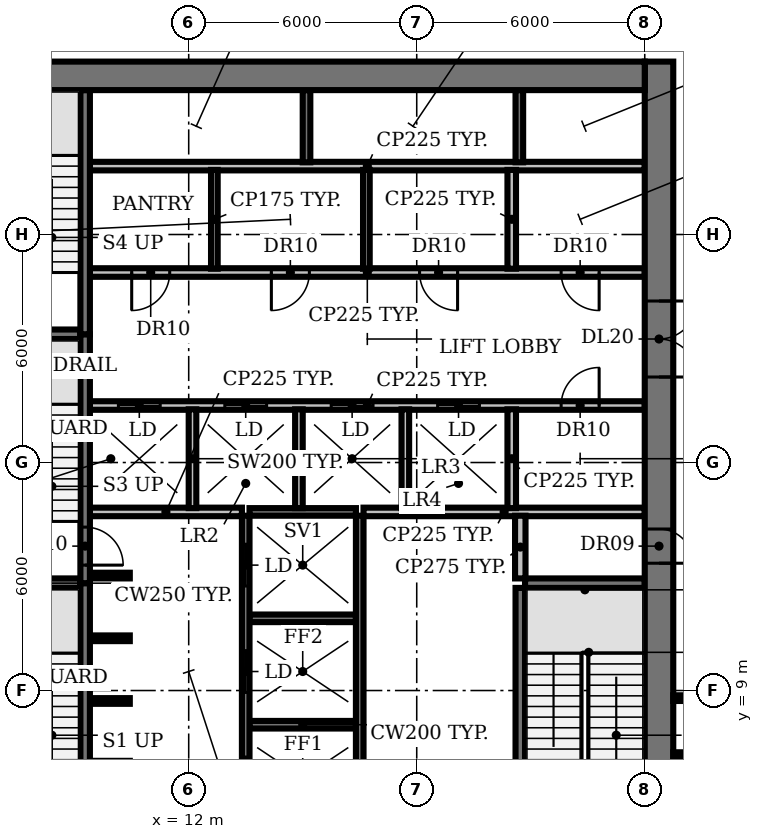
"""IFC4 building model, lengths in metres.
Left out: names, types, materials, properties, quantities, classifications, styles, units other than length and angle.
Written with IfcOpenShell. Run it as: python <this file> out.ifc"""

import sys

from ifc_helpers import new_model, si_unit, direction, frame, frame_2d, origin, place, context, subcontext, project, spatial, rectangle, extrude, element, fill, save


model = new_model("IFC4")
c1 = context("Model", 3, precision=1e-05, world=origin(), true_north=direction((0.0, 1.0)))
c2 = subcontext(c1, "Body", "Model", "MODEL_VIEW")
j1 = project(units=[si_unit("LENGTHUNIT", "METRE"), si_unit("PLANEANGLEUNIT", "RADIAN")], contexts=[c1])
p1 = place(None, origin())
s1 = spatial("IfcSite", under=j1, at=p1, CompositionType="ELEMENT")
p2 = place(p1, origin())
s2 = spatial("IfcBuilding", under=s1, at=p2, CompositionType="ELEMENT")
p3 = place(p2, frame((0.0, 0.0, 92.0)))
s3 = spatial("IfcBuildingStorey", under=s2, at=p3, CompositionType="ELEMENT", Elevation=92.0)
p4 = place(p3, frame((13.6, 8.1, 0.0), z_axis=(0.0, 0.0, 1.0), x_axis=(1.0, 0.0, 0.0)))
e1 = element("IfcWall", 1, at=p4, inside=s3, PredefinedType="SHEAR", context=c2, shape_type="SweptSolid", body=[
    extrude(rectangle(XDim=2.8, YDim=0.2, at=frame_2d((1.4, 0.0))), origin(), (0.0, 0.0, 1.0), 3.85),
])
for number, where, z_axis, x_axis in (
    (2, (9.4, 8.725, 0.0), (0.0, 0.0, 1.0), (1.0, 0.0, 0.0)),
    (3, (9.4, 10.375, 0.0), (0.0, 0.0, 1.0), (1.0, 0.0, 0.0)),
):
    element("IfcWall", number, at=place(p3, frame(where, z_axis=z_axis, x_axis=x_axis)), inside=s3, PredefinedType="SHEAR", context=c2, shape_type="SweptSolid", body=[
        extrude(rectangle(XDim=1.05, YDim=0.15, at=frame_2d((0.525, 0.0))), origin(), (0.0, 0.0, 1.0), 3.85),
    ])
p5 = place(p3, frame((13.6, 10.9, 0.0), z_axis=(0.0, 0.0, 1.0), x_axis=(1.0, 0.0, 0.0)))
e4 = element("IfcWall", 4, at=p5, inside=s3, PredefinedType="SHEAR", context=c2, shape_type="SweptSolid", body=[
    extrude(rectangle(XDim=2.8, YDim=0.2, at=frame_2d((1.4, 0.0))), origin(), (0.0, 0.0, 1.0), 3.85),
])
for number, where, z_axis, x_axis in (
    (5, (6.0, 11.825, 0.0), (0.0, 0.0, 1.0), (1.0, 0.0, 0.0)),
    (6, (20.85, 11.825, 0.0), (0.0, 0.0, 1.0), (1.0, 0.0, 0.0)),
):
    element("IfcWall", number, at=place(p3, frame(where, z_axis=z_axis, x_axis=x_axis)), inside=s3, PredefinedType="SHEAR", context=c2, shape_type="SweptSolid", body=[
        extrude(rectangle(XDim=3.15, YDim=0.25, at=frame_2d((1.575, 0.0))), origin(), (0.0, 0.0, 1.0), 3.85),
    ])
p6 = place(p3, frame((9.4, 12.025, 0.0), z_axis=(0.0, 0.0, 1.0), x_axis=(1.0, 0.0, 0.0)))
e7 = element("IfcWall", 7, at=p6, inside=s3, PredefinedType="SHEAR", context=c2, shape_type="SweptSolid", body=[
    extrude(rectangle(XDim=1.05, YDim=0.15, at=frame_2d((0.525, 0.0))), origin(), (0.0, 0.0, 1.0), 3.85),
])
p7 = place(p3, frame((9.4, 13.7, 0.0), z_axis=(0.0, 0.0, 1.0), x_axis=(1.0, 0.0, 0.0)))
e8 = element("IfcWall", 8, at=p7, inside=s3, PredefinedType="PARTITIONING", context=c2, shape_type="SweptSolid", body=[
    extrude(rectangle(XDim=4.0, YDim=0.225, at=frame_2d((2.0, 0.0))), origin(), (0.0, 0.0, 1.0), 3.85),
])
p8 = place(p3, frame((13.6, 13.7, 0.0), z_axis=(0.0, 0.0, 1.0), x_axis=(1.0, 0.0, 0.0)))
e9 = element("IfcWall", 9, at=p8, inside=s3, PredefinedType="SHEAR", context=c2, shape_type="SweptSolid", body=[
    extrude(rectangle(XDim=2.8, YDim=0.2, at=frame_2d((1.4, 0.0))), origin(), (0.0, 0.0, 1.0), 3.85),
])
p9 = place(p3, frame((16.6, 13.7, 0.0), z_axis=(0.0, 0.0, 1.0), x_axis=(1.0, 0.0, 0.0)))
e10 = element("IfcWall", 10, at=p9, inside=s3, PredefinedType="PARTITIONING", context=c2, shape_type="SweptSolid", body=[
    extrude(rectangle(XDim=7.4, YDim=0.225, at=frame_2d((3.7, 0.0))), origin(), (0.0, 0.0, 1.0), 3.85),
])
p10 = place(p3, frame((9.4, 16.5, 0.0), z_axis=(0.0, 0.0, 1.0), x_axis=(1.0, 0.0, 0.0)))
e11 = element("IfcWall", 11, at=p10, inside=s3, PredefinedType="PARTITIONING", context=c2, shape_type="SweptSolid", body=[
    extrude(rectangle(XDim=14.6, YDim=0.225, at=frame_2d((7.3, 0.0))), origin(), (0.0, 0.0, 1.0), 3.85),
])
p11 = place(p10, frame((0.75, 0.0, 0.0)))
e12 = element("IfcOpeningElement", 12, at=p11, cuts=e11, PredefinedType="OPENING", context=c2, shape_type="SweptSolid", body=[
    extrude(rectangle(XDim=1.1, YDim=2.1, at=frame_2d((0.55, 1.05))), frame((0.0, 0.123, 0.0), z_axis=(0.0, -1.0, 0.0), x_axis=(1.0, 0.0, 0.0)), (0.0, 0.0, 1.0), 0.245),
])
p12 = place(p10, frame((3.55, 0.0, 0.0)))
e13 = element("IfcOpeningElement", 13, at=p12, cuts=e11, PredefinedType="OPENING", context=c2, shape_type="SweptSolid", body=[
    extrude(rectangle(XDim=1.1, YDim=2.1, at=frame_2d((0.55, 1.05))), frame((0.0, 0.123, 0.0), z_axis=(0.0, -1.0, 0.0), x_axis=(1.0, 0.0, 0.0)), (0.0, 0.0, 1.0), 0.245),
])
p13 = place(p10, frame((6.35, 0.0, 0.0)))
e14 = element("IfcOpeningElement", 14, at=p13, cuts=e11, PredefinedType="OPENING", context=c2, shape_type="SweptSolid", body=[
    extrude(rectangle(XDim=1.1, YDim=2.1, at=frame_2d((0.55, 1.05))), frame((0.0, 0.123, 0.0), z_axis=(0.0, -1.0, 0.0), x_axis=(1.0, 0.0, 0.0)), (0.0, 0.0, 1.0), 0.245),
])
p14 = place(p10, frame((9.15, 0.0, 0.0)))
e15 = element("IfcOpeningElement", 15, at=p14, cuts=e11, PredefinedType="OPENING", context=c2, shape_type="SweptSolid", body=[
    extrude(rectangle(XDim=1.1, YDim=2.1, at=frame_2d((0.55, 1.05))), frame((0.0, 0.123, 0.0), z_axis=(0.0, -1.0, 0.0), x_axis=(1.0, 0.0, 0.0)), (0.0, 0.0, 1.0), 0.245),
])
p15 = place(p10, frame((12.4, 0.0, 0.0)))
e16 = element("IfcOpeningElement", 16, at=p15, cuts=e11, PredefinedType="OPENING", context=c2, shape_type="SweptSolid", body=[
    extrude(rectangle(XDim=1.0, YDim=2.1, at=frame_2d((0.5, 1.05))), frame((0.0, 0.123, 0.0), z_axis=(0.0, -1.0, 0.0), x_axis=(1.0, 0.0, 0.0)), (0.0, 0.0, 1.0), 0.245),
])
p16 = place(p3, frame((6.0, 18.375, 0.0), z_axis=(0.0, 0.0, 1.0), x_axis=(1.0, 0.0, 0.0)))
e17 = element("IfcWall", 17, at=p16, inside=s3, PredefinedType="SHEAR", context=c2, shape_type="SweptSolid", body=[
    extrude(rectangle(XDim=3.15, YDim=0.25, at=frame_2d((1.575, 0.0))), origin(), (0.0, 0.0, 1.0), 3.85),
])
p17 = place(p3, frame((24.0, 20.0, 0.0), z_axis=(0.0, 0.0, 1.0), x_axis=(-1.0, 0.0, 0.0)))
e18 = element("IfcWall", 18, at=p17, inside=s3, PredefinedType="PARTITIONING", context=c2, shape_type="SweptSolid", body=[
    extrude(rectangle(XDim=14.6, YDim=0.225, at=frame_2d((7.3, 0.0))), origin(), (0.0, 0.0, 1.0), 3.85),
])
p18 = place(p17, frame((12.5, 0.0, 0.0)))
e19 = element("IfcOpeningElement", 19, at=p18, cuts=e18, PredefinedType="OPENING", context=c2, shape_type="SweptSolid", body=[
    extrude(rectangle(XDim=1.0, YDim=2.1, at=frame_2d((0.5, 1.05))), frame((0.0, 0.123, 0.0), z_axis=(0.0, -1.0, 0.0), x_axis=(1.0, 0.0, 0.0)), (0.0, 0.0, 1.0), 0.245),
])
p19 = place(p17, frame((8.825, 0.0, 0.0)))
e20 = element("IfcOpeningElement", 20, at=p19, cuts=e18, PredefinedType="OPENING", context=c2, shape_type="SweptSolid", body=[
    extrude(rectangle(XDim=1.0, YDim=2.1, at=frame_2d((0.5, 1.05))), frame((0.0, 0.123, 0.0), z_axis=(0.0, -1.0, 0.0), x_axis=(1.0, 0.0, 0.0)), (0.0, 0.0, 1.0), 0.245),
])
p20 = place(p17, frame((4.925, 0.0, 0.0)))
e21 = element("IfcOpeningElement", 21, at=p20, cuts=e18, PredefinedType="OPENING", context=c2, shape_type="SweptSolid", body=[
    extrude(rectangle(XDim=1.0, YDim=2.1, at=frame_2d((0.5, 1.05))), frame((0.0, 0.123, 0.0), z_axis=(0.0, -1.0, 0.0), x_axis=(1.0, 0.0, 0.0)), (0.0, 0.0, 1.0), 0.245),
])
p21 = place(p17, frame((1.2, 0.0, 0.0)))
e22 = element("IfcOpeningElement", 22, at=p21, cuts=e18, PredefinedType="OPENING", context=c2, shape_type="SweptSolid", body=[
    extrude(rectangle(XDim=1.0, YDim=2.1, at=frame_2d((0.5, 1.05))), frame((0.0, 0.123, 0.0), z_axis=(0.0, -1.0, 0.0), x_axis=(1.0, 0.0, 0.0)), (0.0, 0.0, 1.0), 0.245),
])
p22 = place(p3, frame((9.4, 22.8, 0.0), z_axis=(0.0, 0.0, 1.0), x_axis=(1.0, 0.0, 0.0)))
e23 = element("IfcWall", 23, at=p22, inside=s3, PredefinedType="PARTITIONING", context=c2, shape_type="SweptSolid", body=[
    extrude(rectangle(XDim=14.6, YDim=0.225, at=frame_2d((7.3, 0.0))), origin(), (0.0, 0.0, 1.0), 3.85),
])
p23 = place(p3, frame((9.275, 11.825, 0.0), z_axis=(0.0, 0.0, 1.0), x_axis=(0.0, -1.0, 0.0)))
e24 = element("IfcWall", 24, at=p23, inside=s3, PredefinedType="SHEAR", context=c2, shape_type="SweptSolid", body=[
    extrude(rectangle(XDim=6.425, YDim=0.25, at=frame_2d((3.212, 0.0))), origin(), (0.0, 0.0, 1.0), 3.85),
])
p24 = place(p23, frame((5.075, 0.0, 0.0)))
e25 = element("IfcOpeningElement", 25, at=p24, cuts=e24, PredefinedType="OPENING", context=c2, shape_type="SweptSolid", body=[
    extrude(rectangle(XDim=1.0, YDim=2.1, at=frame_2d((0.5, 1.05))), frame((0.0, 0.135, 0.0), z_axis=(0.0, -1.0, 0.0), x_axis=(1.0, 0.0, 0.0)), (0.0, 0.0, 1.0), 0.27),
])
p25 = place(p3, frame((9.275, 18.375, 0.0), z_axis=(0.0, 0.0, 1.0), x_axis=(0.0, -1.0, 0.0)))
e26 = element("IfcWall", 26, at=p25, inside=s3, PredefinedType="SHEAR", context=c2, shape_type="SweptSolid", body=[
    extrude(rectangle(XDim=6.55, YDim=0.25, at=frame_2d((3.275, 0.0))), origin(), (0.0, 0.0, 1.0), 3.85),
])
p26 = place(p25, frame((5.075, 0.0, 0.0)))
e27 = element("IfcOpeningElement", 27, at=p26, cuts=e26, PredefinedType="OPENING", context=c2, shape_type="SweptSolid", body=[
    extrude(rectangle(XDim=1.0, YDim=2.1, at=frame_2d((0.5, 1.05))), frame((0.0, 0.135, 0.0), z_axis=(0.0, -1.0, 0.0), x_axis=(1.0, 0.0, 0.0)), (0.0, 0.0, 1.0), 0.27),
])
p27 = place(p3, frame((9.275, 18.375, 0.0), z_axis=(0.0, 0.0, 1.0), x_axis=(0.0, 1.0, 0.0)))
e28 = element("IfcWall", 28, at=p27, inside=s3, PredefinedType="SHEAR", context=c2, shape_type="SweptSolid", body=[
    extrude(rectangle(XDim=6.425, YDim=0.25, at=frame_2d((3.212, 0.0))), origin(), (0.0, 0.0, 1.0), 3.85),
])
p28 = place(p3, frame((12.1, 13.8, 0.0), z_axis=(0.0, 0.0, 1.0), x_axis=(0.0, 1.0, 0.0)))
e29 = element("IfcWall", 29, at=p28, inside=s3, PredefinedType="SOLIDWALL", context=c2, shape_type="SweptSolid", body=[
    extrude(rectangle(XDim=2.6, YDim=0.2, at=frame_2d((1.3, 0.0))), origin(), (0.0, 0.0, 1.0), 3.85),
])
p29 = place(p3, frame((12.675, 20.1, 0.0), z_axis=(0.0, 0.0, 1.0), x_axis=(0.0, 1.0, 0.0)))
e30 = element("IfcWall", 30, at=p29, inside=s3, PredefinedType="PARTITIONING", context=c2, shape_type="SweptSolid", body=[
    extrude(rectangle(XDim=2.6, YDim=0.175, at=frame_2d((1.3, 0.0))), origin(), (0.0, 0.0, 1.0), 3.85),
])
p30 = place(p3, frame((13.5, 5.4, 0.0), z_axis=(0.0, 0.0, 1.0), x_axis=(0.0, 1.0, 0.0)))
e31 = element("IfcWall", 31, at=p30, inside=s3, PredefinedType="SHEAR", context=c2, shape_type="SweptSolid", body=[
    extrude(rectangle(XDim=8.2, YDim=0.2, at=frame_2d((4.1, 0.0))), origin(), (0.0, 0.0, 1.0), 3.85),
])
p31 = place(p30, frame((0.75, 0.0, 0.0)))
e32 = element("IfcOpeningElement", 32, at=p31, cuts=e31, PredefinedType="OPENING", context=c2, shape_type="SweptSolid", body=[
    extrude(rectangle(XDim=1.1, YDim=2.1, at=frame_2d((0.55, 1.05))), frame((0.0, 0.11, 0.0), z_axis=(0.0, -1.0, 0.0), x_axis=(1.0, 0.0, 0.0)), (0.0, 0.0, 1.0), 0.22),
])
p32 = place(p30, frame((3.55, 0.0, 0.0)))
e33 = element("IfcOpeningElement", 33, at=p32, cuts=e31, PredefinedType="OPENING", context=c2, shape_type="SweptSolid", body=[
    extrude(rectangle(XDim=1.1, YDim=2.1, at=frame_2d((0.55, 1.05))), frame((0.0, 0.11, 0.0), z_axis=(0.0, -1.0, 0.0), x_axis=(1.0, 0.0, 0.0)), (0.0, 0.0, 1.0), 0.22),
])
p33 = place(p30, frame((6.35, 0.0, 0.0)))
e34 = element("IfcOpeningElement", 34, at=p33, cuts=e31, PredefinedType="OPENING", context=c2, shape_type="SweptSolid", body=[
    extrude(rectangle(XDim=1.1, YDim=2.1, at=frame_2d((0.55, 1.05))), frame((0.0, 0.11, 0.0), z_axis=(0.0, -1.0, 0.0), x_axis=(1.0, 0.0, 0.0)), (0.0, 0.0, 1.0), 0.22),
])
p34 = place(p3, frame((14.9, 13.8, 0.0), z_axis=(0.0, 0.0, 1.0), x_axis=(0.0, 1.0, 0.0)))
e35 = element("IfcWall", 35, at=p34, inside=s3, PredefinedType="SOLIDWALL", context=c2, shape_type="SweptSolid", body=[
    extrude(rectangle(XDim=2.6, YDim=0.2, at=frame_2d((1.3, 0.0))), origin(), (0.0, 0.0, 1.0), 3.85),
])
p35 = place(p3, frame((15.1, 22.9, 0.0), z_axis=(0.0, 0.0, 1.0), x_axis=(0.0, 1.0, 0.0)))
e36 = element("IfcWall", 36, at=p35, inside=s3, PredefinedType="SHEAR", context=c2, shape_type="SweptSolid", body=[
    extrude(rectangle(XDim=1.9, YDim=0.2, at=frame_2d((0.95, 0.0))), origin(), (0.0, 0.0, 1.0), 3.85),
])
p36 = place(p3, frame((16.5, 5.4, 0.0), z_axis=(0.0, 0.0, 1.0), x_axis=(0.0, 1.0, 0.0)))
e37 = element("IfcWall", 37, at=p36, inside=s3, PredefinedType="SHEAR", context=c2, shape_type="SweptSolid", body=[
    extrude(rectangle(XDim=8.2, YDim=0.2, at=frame_2d((4.1, 0.0))), origin(), (0.0, 0.0, 1.0), 3.85),
])
p37 = place(p3, frame((16.675, 20.1, 0.0), z_axis=(0.0, 0.0, 1.0), x_axis=(0.0, 1.0, 0.0)))
e38 = element("IfcWall", 38, at=p37, inside=s3, PredefinedType="PARTITIONING", context=c2, shape_type="SweptSolid", body=[
    extrude(rectangle(XDim=2.6, YDim=0.175, at=frame_2d((1.3, 0.0))), origin(), (0.0, 0.0, 1.0), 3.85),
])
p38 = place(p3, frame((17.7, 13.8, 0.0), z_axis=(0.0, 0.0, 1.0), x_axis=(0.0, 1.0, 0.0)))
e39 = element("IfcWall", 39, at=p38, inside=s3, PredefinedType="SOLIDWALL", context=c2, shape_type="SweptSolid", body=[
    extrude(rectangle(XDim=2.6, YDim=0.2, at=frame_2d((1.3, 0.0))), origin(), (0.0, 0.0, 1.0), 3.85),
])
for number, where, z_axis, x_axis in (
    (40, (20.5, 13.8, 0.0), (0.0, 0.0, 1.0), (0.0, 1.0, 0.0)),
    (41, (20.5, 20.1, 0.0), (0.0, 0.0, 1.0), (0.0, 1.0, 0.0)),
):
    element("IfcWall", number, at=place(p3, frame(where, z_axis=z_axis, x_axis=x_axis)), inside=s3, PredefinedType="PARTITIONING", context=c2, shape_type="SweptSolid", body=[
        extrude(rectangle(XDim=2.6, YDim=0.225, at=frame_2d((1.3, 0.0))), origin(), (0.0, 0.0, 1.0), 3.85),
    ])
p39 = place(p3, frame((20.7, 22.9, 0.0), z_axis=(0.0, 0.0, 1.0), x_axis=(0.0, 1.0, 0.0)))
e42 = element("IfcWall", 42, at=p39, inside=s3, PredefinedType="SHEAR", context=c2, shape_type="SweptSolid", body=[
    extrude(rectangle(XDim=1.9, YDim=0.2, at=frame_2d((0.95, 0.0))), origin(), (0.0, 0.0, 1.0), 3.85),
])
p40 = place(p3, frame((20.725, 5.4, 0.0), z_axis=(0.0, 0.0, 1.0), x_axis=(0.0, 1.0, 0.0)))
e43 = element("IfcWall", 43, at=p40, inside=s3, PredefinedType="SHEAR", context=c2, shape_type="SweptSolid", body=[
    extrude(rectangle(XDim=6.3, YDim=0.25, at=frame_2d((3.15, 0.0))), origin(), (0.0, 0.0, 1.0), 3.85),
])
p41 = place(p3, frame((20.725, 11.95, 0.0), z_axis=(0.0, 0.0, 1.0), x_axis=(0.0, 1.0, 0.0)))
e44 = element("IfcWall", 44, at=p41, inside=s3, PredefinedType="PARTITIONING", context=c2, shape_type="SweptSolid", body=[
    extrude(rectangle(XDim=1.65, YDim=0.275, at=frame_2d((0.825, 0.0))), origin(), (0.0, 0.0, 1.0), 3.85),
])
p42 = place(p3, frame((24.375, 25.55, 0.0), z_axis=(0.0, 0.0, 1.0), x_axis=(0.0, -1.0, 0.0)))
e45 = element("IfcWall", 45, at=p42, inside=s3, PredefinedType="SHEAR", context=c2, shape_type="SweptSolid", body=[
    extrude(rectangle(XDim=21.13, YDim=0.75, at=frame_2d((10.565, 0.0))), origin(), (0.0, 0.0, 1.0), 3.85),
])
p43 = place(p42, frame((18.4, 0.0, 0.0)))
e46 = element("IfcOpeningElement", 46, at=p43, cuts=e45, PredefinedType="OPENING", context=c2, shape_type="SweptSolid", body=[
    extrude(rectangle(XDim=1.5, YDim=2.1, at=frame_2d((0.75, 1.05))), frame((0.0, 0.385, 0.0), z_axis=(0.0, -1.0, 0.0), x_axis=(1.0, 0.0, 0.0)), (0.0, 0.0, 1.0), 0.77),
])
p44 = place(p42, frame((12.3, 0.0, 0.0)))
e47 = element("IfcOpeningElement", 47, at=p44, cuts=e45, PredefinedType="OPENING", context=c2, shape_type="SweptSolid", body=[
    extrude(rectangle(XDim=0.9, YDim=2.1, at=frame_2d((0.45, 1.05))), frame((0.0, 0.385, 0.0), z_axis=(0.0, -1.0, 0.0), x_axis=(1.0, 0.0, 0.0)), (0.0, 0.0, 1.0), 0.77),
])
p45 = place(p42, frame((6.3, 0.0, 0.0)))
e48 = element("IfcOpeningElement", 48, at=p45, cuts=e45, PredefinedType="OPENING", context=c2, shape_type="SweptSolid", body=[
    extrude(rectangle(XDim=2.0, YDim=2.1, at=frame_2d((1.0, 1.05))), frame((0.0, 0.385, 0.0), z_axis=(0.0, -1.0, 0.0), x_axis=(1.0, 0.0, 0.0)), (0.0, 0.0, 1.0), 0.77),
])
p46 = place(p3, frame((6.0, 25.175, 0.0), z_axis=(0.0, 0.0, 1.0), x_axis=(1.0, 0.0, 0.0)))
e49 = element("IfcWall", 49, at=p46, inside=s3, PredefinedType="SHEAR", context=c2, shape_type="SweptSolid", body=[
    extrude(rectangle(XDim=18.0, YDim=0.75, at=frame_2d((9.0, 0.0))), origin(), (0.0, 0.0, 1.0), 3.85),
])
for number, where, z_axis, x_axis in (
    (50, (24.75, 7.3, 0.0), (0.0, 0.0, 1.0), (1.0, 0.0, 0.0)),
    (51, (24.75, 8.8, 0.0), (0.0, 0.0, 1.0), (1.0, 0.0, 0.0)),
):
    element("IfcWall", number, at=place(p3, frame(where, z_axis=z_axis, x_axis=x_axis)), inside=s3, PredefinedType="PARTITIONING", context=c2, shape_type="SweptSolid", body=[
        extrude(rectangle(XDim=1.05, YDim=0.15, at=frame_2d((0.525, 0.0))), origin(), (0.0, 0.0, 1.0), 2.83),
    ])
p47 = place(p11, origin())
e52 = element("IfcDoor", 52, at=p47, inside=s3, OperationType="DOUBLE_DOOR_SLIDING", PredefinedType="DOOR", context=c2, shape_type="SweptSolid", body=[
    extrude(rectangle(XDim=1.1, YDim=2.1, at=frame_2d((0.55, 1.05))), frame((0.0, 0.025, 0.0), z_axis=(0.0, -1.0, 0.0), x_axis=(1.0, 0.0, 0.0)), (0.0, 0.0, 1.0), 0.05),
])
fill(e12, e52)
p48 = place(p12, origin())
e53 = element("IfcDoor", 53, at=p48, inside=s3, OperationType="DOUBLE_DOOR_SLIDING", PredefinedType="DOOR", context=c2, shape_type="SweptSolid", body=[
    extrude(rectangle(XDim=1.1, YDim=2.1, at=frame_2d((0.55, 1.05))), frame((0.0, 0.025, 0.0), z_axis=(0.0, -1.0, 0.0), x_axis=(1.0, 0.0, 0.0)), (0.0, 0.0, 1.0), 0.05),
])
fill(e13, e53)
p49 = place(p13, origin())
e54 = element("IfcDoor", 54, at=p49, inside=s3, OperationType="DOUBLE_DOOR_SLIDING", PredefinedType="DOOR", context=c2, shape_type="SweptSolid", body=[
    extrude(rectangle(XDim=1.1, YDim=2.1, at=frame_2d((0.55, 1.05))), frame((0.0, 0.025, 0.0), z_axis=(0.0, -1.0, 0.0), x_axis=(1.0, 0.0, 0.0)), (0.0, 0.0, 1.0), 0.05),
])
fill(e14, e54)
p50 = place(p14, origin())
e55 = element("IfcDoor", 55, at=p50, inside=s3, OperationType="DOUBLE_DOOR_SLIDING", PredefinedType="DOOR", context=c2, shape_type="SweptSolid", body=[
    extrude(rectangle(XDim=1.1, YDim=2.1, at=frame_2d((0.55, 1.05))), frame((0.0, 0.025, 0.0), z_axis=(0.0, -1.0, 0.0), x_axis=(1.0, 0.0, 0.0)), (0.0, 0.0, 1.0), 0.05),
])
fill(e15, e55)
p51 = place(p15, origin())
e56 = element("IfcDoor", 56, at=p51, inside=s3, OperationType="SINGLE_SWING_RIGHT", PredefinedType="DOOR", context=c2, shape_type="SweptSolid", body=[
    extrude(rectangle(XDim=1.0, YDim=2.1, at=frame_2d((0.5, 1.05))), frame((0.0, 0.025, 0.0), z_axis=(0.0, -1.0, 0.0), x_axis=(1.0, 0.0, 0.0)), (0.0, 0.0, 1.0), 0.05),
])
fill(e16, e56)
p52 = place(p18, origin())
e57 = element("IfcDoor", 57, at=p52, inside=s3, OperationType="SINGLE_SWING_RIGHT", PredefinedType="DOOR", context=c2, shape_type="SweptSolid", body=[
    extrude(rectangle(XDim=1.0, YDim=2.1, at=frame_2d((0.5, 1.05))), frame((0.0, 0.025, 0.0), z_axis=(0.0, -1.0, 0.0), x_axis=(1.0, 0.0, 0.0)), (0.0, 0.0, 1.0), 0.05),
])
fill(e19, e57)
p53 = place(p19, origin())
e58 = element("IfcDoor", 58, at=p53, inside=s3, OperationType="SINGLE_SWING_RIGHT", PredefinedType="DOOR", context=c2, shape_type="SweptSolid", body=[
    extrude(rectangle(XDim=1.0, YDim=2.1, at=frame_2d((0.5, 1.05))), frame((0.0, 0.025, 0.0), z_axis=(0.0, -1.0, 0.0), x_axis=(1.0, 0.0, 0.0)), (0.0, 0.0, 1.0), 0.05),
])
fill(e20, e58)
p54 = place(p20, origin())
e59 = element("IfcDoor", 59, at=p54, inside=s3, OperationType="SINGLE_SWING_LEFT", PredefinedType="DOOR", context=c2, shape_type="SweptSolid", body=[
    extrude(rectangle(XDim=1.0, YDim=2.1, at=frame_2d((0.5, 1.05))), frame((0.0, 0.025, 0.0), z_axis=(0.0, -1.0, 0.0), x_axis=(1.0, 0.0, 0.0)), (0.0, 0.0, 1.0), 0.05),
])
fill(e21, e59)
p55 = place(p21, origin())
e60 = element("IfcDoor", 60, at=p55, inside=s3, OperationType="SINGLE_SWING_LEFT", PredefinedType="DOOR", context=c2, shape_type="SweptSolid", body=[
    extrude(rectangle(XDim=1.0, YDim=2.1, at=frame_2d((0.5, 1.05))), frame((0.0, 0.025, 0.0), z_axis=(0.0, -1.0, 0.0), x_axis=(1.0, 0.0, 0.0)), (0.0, 0.0, 1.0), 0.05),
])
fill(e22, e60)
p56 = place(p26, origin())
e61 = element("IfcDoor", 61, at=p56, inside=s3, OperationType="SINGLE_SWING_RIGHT", PredefinedType="DOOR", context=c2, shape_type="SweptSolid", body=[
    extrude(rectangle(XDim=1.0, YDim=2.1, at=frame_2d((0.5, 1.05))), frame((0.0, 0.025, 0.0), z_axis=(0.0, -1.0, 0.0), x_axis=(1.0, 0.0, 0.0)), (0.0, 0.0, 1.0), 0.05),
])
fill(e27, e61)
p57 = place(p31, origin())
e62 = element("IfcDoor", 62, at=p57, inside=s3, OperationType="DOUBLE_DOOR_SLIDING", PredefinedType="DOOR", context=c2, shape_type="SweptSolid", body=[
    extrude(rectangle(XDim=1.1, YDim=2.1, at=frame_2d((0.55, 1.05))), frame((0.0, 0.025, 0.0), z_axis=(0.0, -1.0, 0.0), x_axis=(1.0, 0.0, 0.0)), (0.0, 0.0, 1.0), 0.05),
])
fill(e32, e62)
p58 = place(p32, origin())
e63 = element("IfcDoor", 63, at=p58, inside=s3, OperationType="DOUBLE_DOOR_SLIDING", PredefinedType="DOOR", context=c2, shape_type="SweptSolid", body=[
    extrude(rectangle(XDim=1.1, YDim=2.1, at=frame_2d((0.55, 1.05))), frame((0.0, 0.025, 0.0), z_axis=(0.0, -1.0, 0.0), x_axis=(1.0, 0.0, 0.0)), (0.0, 0.0, 1.0), 0.05),
])
fill(e33, e63)
p59 = place(p33, origin())
e64 = element("IfcDoor", 64, at=p59, inside=s3, OperationType="DOUBLE_DOOR_SLIDING", PredefinedType="DOOR", context=c2, shape_type="SweptSolid", body=[
    extrude(rectangle(XDim=1.1, YDim=2.1, at=frame_2d((0.55, 1.05))), frame((0.0, 0.025, 0.0), z_axis=(0.0, -1.0, 0.0), x_axis=(1.0, 0.0, 0.0)), (0.0, 0.0, 1.0), 0.05),
])
fill(e34, e64)
p60 = place(p44, origin())
e65 = element("IfcDoor", 65, at=p60, inside=s3, OperationType="SINGLE_SWING_RIGHT", PredefinedType="DOOR", context=c2, shape_type="SweptSolid", body=[
    extrude(rectangle(XDim=0.9, YDim=2.1, at=frame_2d((0.45, 1.05))), frame((0.0, -0.315, 0.0), z_axis=(0.0, -1.0, 0.0), x_axis=(1.0, 0.0, 0.0)), (0.0, 0.0, 1.0), 0.05),
])
fill(e47, e65)
p61 = place(p45, origin())
e66 = element("IfcDoor", 66, at=p61, inside=s3, OperationType="DOUBLE_DOOR_SINGLE_SWING", PredefinedType="DOOR", context=c2, shape_type="SweptSolid", body=[
    extrude(rectangle(XDim=2.0, YDim=2.1, at=frame_2d((1.0, 1.05))), frame((0.0, 0.025, 0.0), z_axis=(0.0, -1.0, 0.0), x_axis=(1.0, 0.0, 0.0)), (0.0, 0.0, 1.0), 0.05),
])
fill(e48, e66)
save(model, sys.argv[1])
